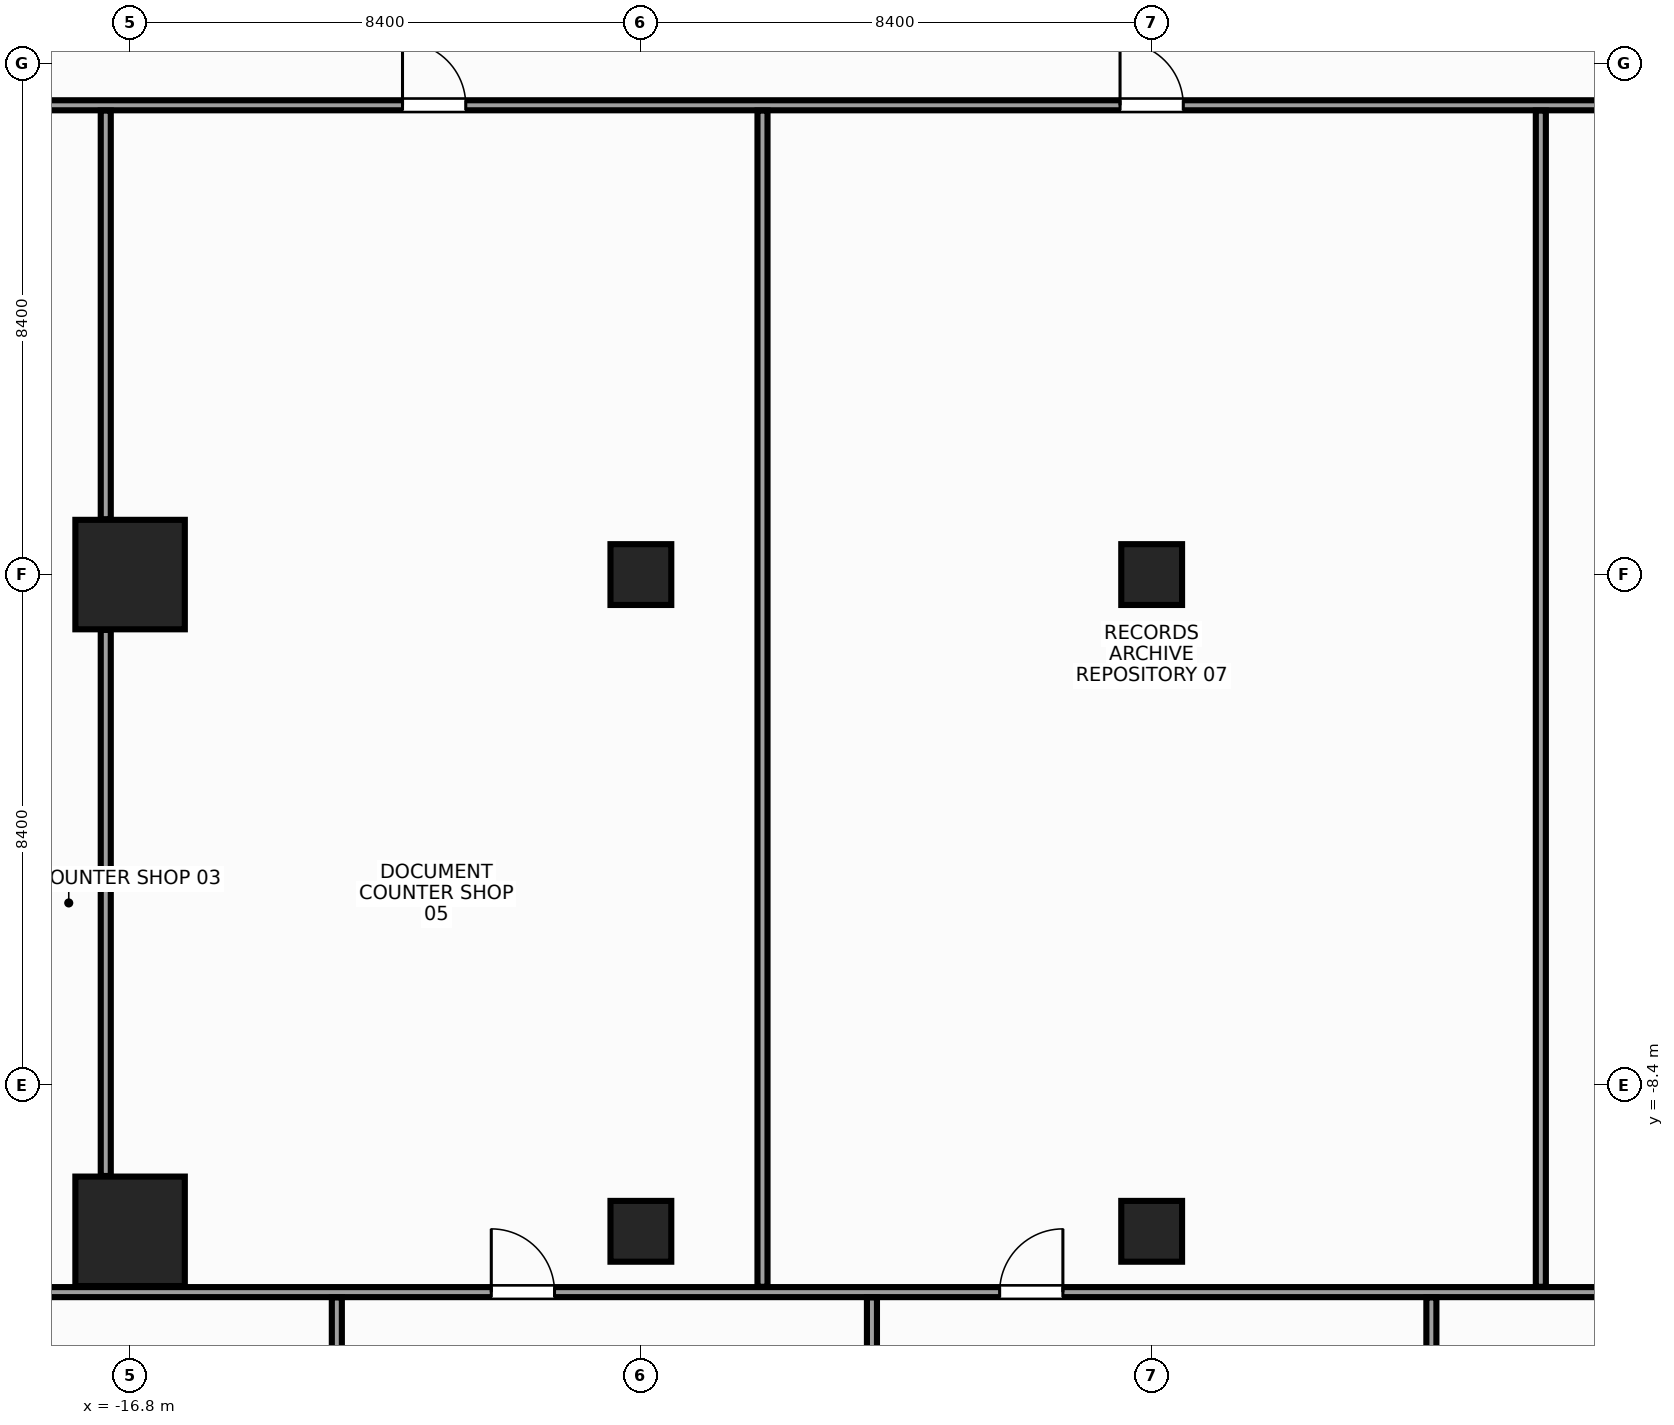
"""IFC4 building model, lengths in metres.
Left out: names, types, materials, properties, quantities, classifications, styles, units other than length and angle.
Written with IfcOpenShell. Run it as: python <this file> out.ifc"""

import sys

from ifc_helpers import new_model, si_unit, direction, frame, frame_2d, origin, origin_2d, place, context, subcontext, project, spatial, rectangle, hollow_rectangle, extrude, source, transform, mapped, element, fill, save


model = new_model("IFC4")
c1 = context("Model", 3, precision=1e-05, world=origin(), true_north=direction((0.0, 1.0)))
c2 = subcontext(c1, "Body", "Model", "MODEL_VIEW")
j1 = project(units=[si_unit("LENGTHUNIT", "METRE"), si_unit("PLANEANGLEUNIT", "RADIAN")], contexts=[c1])
p1 = place(None, origin())
s1 = spatial("IfcSite", under=j1, at=p1, CompositionType="ELEMENT")
p2 = place(p1, origin())
s2 = spatial("IfcBuilding", under=s1, at=p2, CompositionType="ELEMENT")
p3 = place(p2, frame((0.0, 0.0, 59.6)))
s3 = spatial("IfcBuildingStorey", under=s2, at=p3, CompositionType="ELEMENT", Elevation=59.6)
m1 = source(origin(), c2, "Body", "SweptSolid", [
    extrude(rectangle(XDim=1.8, YDim=1.8, at=origin_2d()), origin(), (0.0, 0.0, 1.0), 3.6),
])
for number, where, z_axis, x_axis in (
    (1, (-16.8, -10.8, 0.0), (0.0, 0.0, 1.0), (1.0, 0.0, 0.0)),
    (2, (-16.8, 0.0, 0.0), (0.0, 0.0, 1.0), (1.0, 0.0, 0.0)),
):
    element("IfcColumn", number, at=place(p3, frame(where, z_axis=z_axis, x_axis=x_axis)), inside=s3, PredefinedType="COLUMN", context=c2, shape_type="MappedRepresentation", body=[
        mapped(m1, transform((0.0, 0.0, 0.0), x_axis=(1.0, 0.0, 0.0), y_axis=(0.0, 1.0, 0.0), z_axis=(0.0, 0.0, 1.0), scale=1.0)),
    ])
m2 = source(origin(), c2, "Body", "SweptSolid", [
    extrude(hollow_rectangle(XDim=1.0, YDim=1.0, WallThickness=0.045, at=origin_2d()), origin(), (0.0, 0.0, 1.0), 3.6),
])
for number, where, z_axis, x_axis in (
    (3, (-8.4, 0.0, 0.0), (0.0, 0.0, 1.0), (1.0, 0.0, 0.0)),
    (4, (-8.4, -10.8, 0.0), (0.0, 0.0, 1.0), (1.0, 0.0, 0.0)),
):
    element("IfcColumn", number, at=place(p3, frame(where, z_axis=z_axis, x_axis=x_axis)), inside=s3, PredefinedType="COLUMN", context=c2, shape_type="MappedRepresentation", body=[
        mapped(m2, transform((0.0, 0.0, 0.0), x_axis=(1.0, 0.0, 0.0), y_axis=(0.0, 1.0, 0.0), z_axis=(0.0, 0.0, 1.0), scale=1.0)),
    ])
m3 = source(origin(), c2, "Body", "SweptSolid", [
    extrude(rectangle(XDim=1.0, YDim=1.0, at=origin_2d()), origin(), (0.0, 0.0, 1.0), 3.6),
])
for number, where, z_axis, x_axis in (
    (5, (0.0, -10.8, 0.0), (0.0, 0.0, 1.0), (1.0, 0.0, 0.0)),
    (6, (0.0, 0.0, 0.0), (0.0, 0.0, 1.0), (1.0, 0.0, 0.0)),
):
    element("IfcColumn", number, at=place(p3, frame(where, z_axis=z_axis, x_axis=x_axis)), inside=s3, PredefinedType="COLUMN", context=c2, shape_type="MappedRepresentation", body=[
        mapped(m3, transform((0.0, 0.0, 0.0), x_axis=(1.0, 0.0, 0.0), y_axis=(0.0, 1.0, 0.0), z_axis=(0.0, 0.0, 1.0), scale=1.0)),
    ])
m4 = source(origin(), c2, "Body", "SweptSolid", [
    extrude(rectangle(XDim=36.67, YDim=0.165, at=frame_2d((18.335, 0.0))), origin(), (0.0, 0.0, 1.0), 2.745),
])
p4 = place(p3, frame((-18.335, 7.718, 0.0), z_axis=(0.0, 0.0, 1.0), x_axis=(1.0, 0.0, 0.0)))
e7 = element("IfcWall", 7, at=p4, inside=s3, PredefinedType="PARTITIONING", context=c2, shape_type="MappedRepresentation", body=[
    mapped(m4, transform((0.0, 0.0, 0.0), x_axis=(1.0, 0.0, 0.0), y_axis=(0.0, 1.0, 0.0), z_axis=(0.0, 0.0, 1.0), scale=1.0)),
])
p5 = place(p4, frame((6.015, 0.0, 0.0)))
e8 = element("IfcOpeningElement", 8, at=p5, cuts=e7, PredefinedType="OPENING", context=c2, shape_type="SweptSolid", body=[
    extrude(rectangle(XDim=1.04, YDim=2.2, at=frame_2d((0.52, 1.1))), frame((0.0, 0.094, 0.0), z_axis=(0.0, -1.0, 0.0), x_axis=(1.0, 0.0, 0.0)), (0.0, 0.0, 1.0), 0.189),
])
p6 = place(p4, frame((29.615, 0.0, 0.0)))
e9 = element("IfcOpeningElement", 9, at=p6, cuts=e7, PredefinedType="OPENING", context=c2, shape_type="SweptSolid", body=[
    extrude(rectangle(XDim=1.04, YDim=2.2, at=frame_2d((0.52, 1.1))), frame((0.0, 0.094, 0.0), z_axis=(0.0, -1.0, 0.0), x_axis=(1.0, 0.0, 0.0)), (0.0, 0.0, 1.0), 0.189),
])
p7 = place(p4, frame((17.815, 0.0, 0.0)))
e10 = element("IfcOpeningElement", 10, at=p7, cuts=e7, PredefinedType="OPENING", context=c2, shape_type="SweptSolid", body=[
    extrude(rectangle(XDim=1.04, YDim=2.2, at=frame_2d((0.52, 1.1))), frame((0.0, 0.094, 0.0), z_axis=(0.0, -1.0, 0.0), x_axis=(1.0, 0.0, 0.0)), (0.0, 0.0, 1.0), 0.189),
])
m5 = source(origin(), c2, "Body", "SweptSolid", [
    extrude(rectangle(XDim=36.66, YDim=0.165, at=frame_2d((18.33, 0.0))), origin(), (0.0, 0.0, 1.0), 2.945),
])
p8 = place(p3, frame((-18.33, -11.8, 0.0), z_axis=(0.0, 0.0, 1.0), x_axis=(1.0, 0.0, 0.0)))
e11 = element("IfcWall", 11, at=p8, inside=s3, PredefinedType="PARTITIONING", context=c2, shape_type="MappedRepresentation", body=[
    mapped(m5, transform((0.0, 0.0, 0.0), x_axis=(1.0, 0.0, 0.0), y_axis=(0.0, 1.0, 0.0), z_axis=(0.0, 0.0, 1.0), scale=1.0)),
])
p9 = place(p8, frame((7.47, 0.0, 0.0)))
e12 = element("IfcOpeningElement", 12, at=p9, cuts=e11, PredefinedType="OPENING", context=c2, shape_type="SweptSolid", body=[
    extrude(rectangle(XDim=1.04, YDim=2.2, at=frame_2d((0.52, 1.1))), frame((0.0, 0.094, 0.0), z_axis=(0.0, -1.0, 0.0), x_axis=(1.0, 0.0, 0.0)), (0.0, 0.0, 1.0), 0.189),
])
p10 = place(p8, frame((15.83, 0.0, 0.0)))
e13 = element("IfcOpeningElement", 13, at=p10, cuts=e11, PredefinedType="OPENING", context=c2, shape_type="SweptSolid", body=[
    extrude(rectangle(XDim=1.04, YDim=2.2, at=frame_2d((0.52, 1.1))), frame((0.0, 0.094, 0.0), z_axis=(0.0, -1.0, 0.0), x_axis=(1.0, 0.0, 0.0)), (0.0, 0.0, 1.0), 0.189),
])
p11 = place(p8, frame((28.15, 0.0, 0.0)))
e14 = element("IfcOpeningElement", 14, at=p11, cuts=e11, PredefinedType="OPENING", context=c2, shape_type="SweptSolid", body=[
    extrude(rectangle(XDim=1.04, YDim=2.2, at=frame_2d((0.52, 1.1))), frame((0.0, 0.094, 0.0), z_axis=(0.0, -1.0, 0.0), x_axis=(1.0, 0.0, 0.0)), (0.0, 0.0, 1.0), 0.189),
])
m6 = source(origin(), c2, "Body", "SweptSolid", [
    extrude(rectangle(XDim=8.98, YDim=0.165, at=frame_2d((4.49, 0.0))), origin(), (0.0, 0.0, 1.0), 3.36),
])
p12 = place(p3, frame((-17.2, -9.89, 0.0), z_axis=(0.0, 0.0, 1.0), x_axis=(0.0, 1.0, 0.0)))
e15 = element("IfcWall", 15, at=p12, inside=s3, PredefinedType="PARTITIONING", context=c2, shape_type="MappedRepresentation", body=[
    mapped(m6, transform((0.0, 0.0, 0.0), x_axis=(1.0, 0.0, 0.0), y_axis=(0.0, 1.0, 0.0), z_axis=(0.0, 0.0, 1.0), scale=1.0)),
])
m7 = source(origin(), c2, "Body", "SweptSolid", [
    extrude(rectangle(XDim=6.72, YDim=0.165, at=frame_2d((3.36, 0.0))), origin(), (0.0, 0.0, 1.0), 3.36),
])
p13 = place(p3, frame((-17.2, 0.91, 0.0), z_axis=(0.0, 0.0, 1.0), x_axis=(0.0, 1.0, 0.0)))
e16 = element("IfcWall", 16, at=p13, inside=s3, PredefinedType="PARTITIONING", context=c2, shape_type="MappedRepresentation", body=[
    mapped(m7, transform((0.0, 0.0, 0.0), x_axis=(1.0, 0.0, 0.0), y_axis=(0.0, 1.0, 0.0), z_axis=(0.0, 0.0, 1.0), scale=1.0)),
])
m8 = source(origin(), c2, "Body", "SweptSolid", [
    extrude(rectangle(XDim=19.342, YDim=0.165, at=frame_2d((9.671, 0.0))), origin(), (0.0, 0.0, 1.0), 2.645),
])
for number, where, z_axis, x_axis in (
    (17, (-6.4, -11.712, 0.0), (0.0, 0.0, 1.0), (0.0, 1.0, 0.0)),
    (18, (6.4, -11.712, 0.0), (0.0, 0.0, 1.0), (0.0, 1.0, 0.0)),
):
    element("IfcWall", number, at=place(p3, frame(where, z_axis=z_axis, x_axis=x_axis)), inside=s3, PredefinedType="PARTITIONING", context=c2, shape_type="MappedRepresentation", body=[
        mapped(m8, transform((0.0, 0.0, 0.0), x_axis=(1.0, 0.0, 0.0), y_axis=(0.0, 1.0, 0.0), z_axis=(0.0, 0.0, 1.0), scale=1.0)),
    ])
m9 = source(origin(), c2, "Body", "SweptSolid", [
    extrude(rectangle(XDim=14.963, YDim=0.165, at=frame_2d((7.481, 0.0))), origin(), (0.0, 0.0, 1.0), 2.745),
])
for number, where, z_axis, x_axis in (
    (19, (-13.4, -26.85, 0.0), (0.0, 0.0, 1.0), (0.0, 1.0, 0.0)),
    (20, (-4.6, -26.85, 0.0), (0.0, 0.0, 1.0), (0.0, 1.0, 0.0)),
    (21, (4.6, -26.85, 0.0), (0.0, 0.0, 1.0), (0.0, 1.0, 0.0)),
):
    element("IfcWall", number, at=place(p3, frame(where, z_axis=z_axis, x_axis=x_axis)), inside=s3, PredefinedType="PARTITIONING", context=c2, shape_type="MappedRepresentation", body=[
        mapped(m9, transform((0.0, 0.0, 0.0), x_axis=(1.0, 0.0, 0.0), y_axis=(0.0, 1.0, 0.0), z_axis=(0.0, 0.0, 1.0), scale=1.0)),
    ])
m10 = source(origin(), c2, "Body", "SweptSolid", [
    extrude(rectangle(XDim=1.04, YDim=2.2, at=frame_2d((0.52, 1.1))), frame((0.0, 0.025, 0.0), z_axis=(0.0, -1.0, 0.0), x_axis=(1.0, 0.0, 0.0)), (0.0, 0.0, 1.0), 0.05),
])
p14 = place(p5, origin())
e22 = element("IfcDoor", 22, at=p14, inside=s3, OperationType="SINGLE_SWING_LEFT", PredefinedType="DOOR", context=c2, shape_type="MappedRepresentation", body=[
    mapped(m10, transform((0.0, 0.0, 0.0), x_axis=(1.0, 0.0, 0.0), y_axis=(0.0, 1.0, 0.0), z_axis=(0.0, 0.0, 1.0), scale=1.0)),
])
fill(e8, e22)
p15 = place(p7, origin())
e23 = element("IfcDoor", 23, at=p15, inside=s3, OperationType="SINGLE_SWING_LEFT", PredefinedType="DOOR", context=c2, shape_type="MappedRepresentation", body=[
    mapped(m10, transform((0.0, 0.0, 0.0), x_axis=(1.0, 0.0, 0.0), y_axis=(0.0, 1.0, 0.0), z_axis=(0.0, 0.0, 1.0), scale=1.0)),
])
fill(e10, e23)
p16 = place(p9, origin())
e24 = element("IfcDoor", 24, at=p16, inside=s3, OperationType="SINGLE_SWING_LEFT", PredefinedType="DOOR", context=c2, shape_type="MappedRepresentation", body=[
    mapped(m10, transform((0.0, 0.0, 0.0), x_axis=(1.0, 0.0, 0.0), y_axis=(0.0, 1.0, 0.0), z_axis=(0.0, 0.0, 1.0), scale=1.0)),
])
fill(e12, e24)
p17 = place(p10, origin())
e25 = element("IfcDoor", 25, at=p17, inside=s3, OperationType="SINGLE_SWING_RIGHT", PredefinedType="DOOR", context=c2, shape_type="MappedRepresentation", body=[
    mapped(m10, transform((0.0, 0.0, 0.0), x_axis=(1.0, 0.0, 0.0), y_axis=(0.0, 1.0, 0.0), z_axis=(0.0, 0.0, 1.0), scale=1.0)),
])
fill(e13, e25)
save(model, sys.argv[1])
